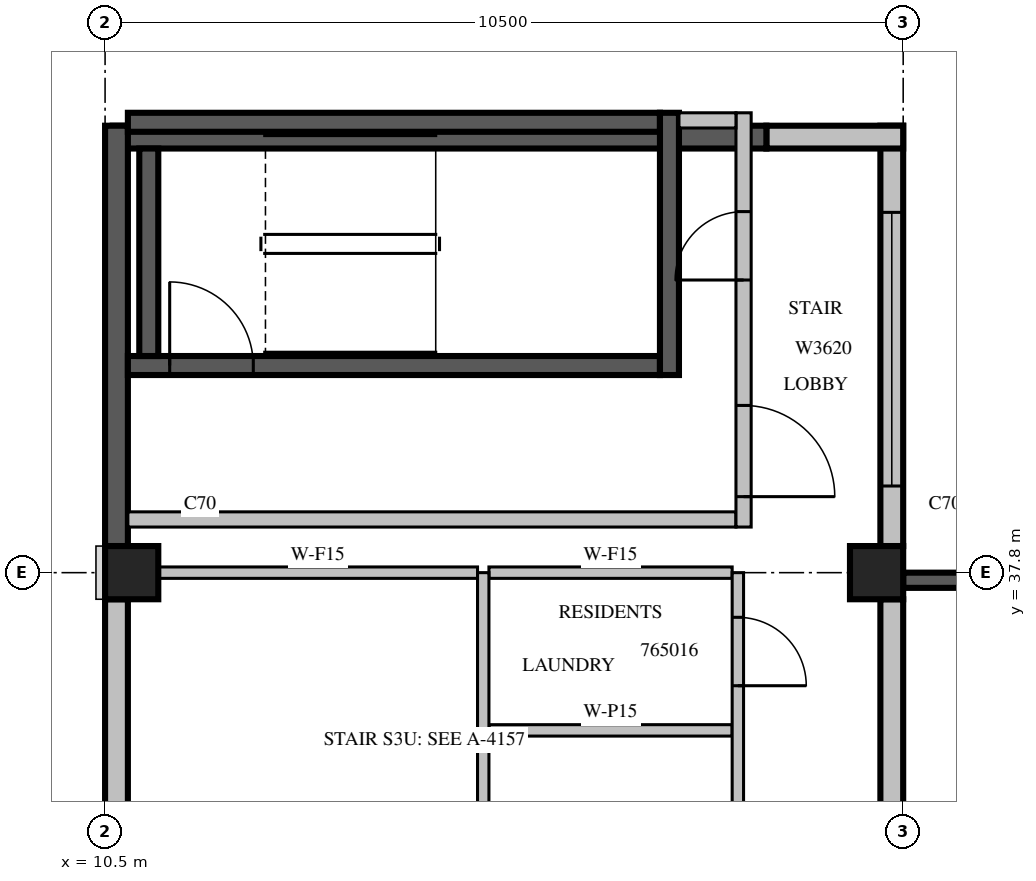
"""IFC4 building model, lengths in metres.
Left out: names, types, materials, properties, quantities, classifications, styles, units other than length and angle.
Written with IfcOpenShell. Run it as: python <this file> out.ifc"""

import sys

from ifc_helpers import new_model, si_unit, direction, frame, frame_2d, origin, origin_2d, place, context, subcontext, project, spatial, rectangle, extrude, source, transform, mapped, element, fill, save


model = new_model("IFC4")
c1 = context("Model", 3, precision=1e-05, world=origin(), true_north=direction((0.0, 1.0)))
c2 = subcontext(c1, "Body", "Model", "MODEL_VIEW")
j1 = project(units=[si_unit("LENGTHUNIT", "METRE"), si_unit("PLANEANGLEUNIT", "RADIAN")], contexts=[c1])
p1 = place(None, origin())
s1 = spatial("IfcSite", under=j1, at=p1, CompositionType="ELEMENT")
p2 = place(p1, origin())
s2 = spatial("IfcBuilding", under=s1, at=p2, CompositionType="ELEMENT")
p3 = place(p2, frame((0.0, 0.0, 288.0)))
s3 = spatial("IfcBuildingStorey", under=s2, at=p3, CompositionType="ELEMENT", Elevation=288.0)
m1 = source(origin(), c2, "Body", "SweptSolid", [
    extrude(rectangle(XDim=0.7, YDim=0.7, at=origin_2d()), origin(), (0.0, 0.0, 1.0), 3.5),
])
for number, where, z_axis, x_axis in (
    (1, (10.85, 37.8, 0.0), (0.0, 0.0, 1.0), (1.0, 0.0, 0.0)),
    (2, (20.65, 37.8, 0.0), (0.0, 0.0, 1.0), (1.0, 0.0, 0.0)),
):
    element("IfcColumn", number, at=place(p3, frame(where, z_axis=z_axis, x_axis=x_axis)), inside=s3, PredefinedType="COLUMN", context=c2, shape_type="MappedRepresentation", body=[
        mapped(m1, transform((0.0, 0.0, 0.0), scale=1.0)),
    ])
m2 = source(origin(), c2, "Body", "SweptSolid", [
    extrude(rectangle(XDim=7.7, YDim=0.3, at=frame_2d((3.85, 0.0))), origin(), (0.0, 0.0, 1.0), 3.1),
])
p4 = place(p3, frame((20.85, 29.75, 0.0), z_axis=(0.0, 0.0, 1.0), x_axis=(0.0, 1.0, 0.0)))
e3 = element("IfcWall", 3, at=p4, inside=s3, PredefinedType="STANDARD", context=c2, shape_type="MappedRepresentation", body=[
    mapped(m2, transform((0.0, 0.0, 0.0), scale=1.0)),
])
m3 = source(origin(), c2, "Body", "SweptSolid", [
    extrude(rectangle(XDim=1.0, YDim=2.1, at=frame_2d((0.5, 1.05))), frame((0.0, 0.16, 0.0), z_axis=(0.0, -1.0, 0.0), x_axis=(1.0, 0.0, 0.0)), (0.0, 0.0, 1.0), 0.32),
])
p5 = place(p4, frame((3.35, 0.0, 0.0)))
e4 = element("IfcOpeningElement", 4, at=p5, cuts=e3, PredefinedType="OPENING", context=c2, shape_type="MappedRepresentation", body=[
    mapped(m3, transform((0.0, 0.0, 0.0), scale=1.0)),
])
m4 = source(origin(), c2, "Body", "SweptSolid", [
    extrude(rectangle(XDim=5.53, YDim=0.3, at=frame_2d((2.765, 0.0))), origin(), (0.0, 0.0, 1.0), 3.1),
])
p6 = place(p3, frame((20.85, 38.15, 0.0), z_axis=(0.0, 0.0, 1.0), x_axis=(0.0, 1.0, 0.0)))
e5 = element("IfcWall", 5, at=p6, inside=s3, PredefinedType="STANDARD", context=c2, shape_type="MappedRepresentation", body=[
    mapped(m4, transform((0.0, 0.0, 0.0), scale=1.0)),
])
m5 = source(origin(), c2, "Body", "SweptSolid", [
    extrude(rectangle(XDim=3.6, YDim=2.0, at=frame_2d((1.8, 1.0))), frame((0.0, 0.16, 0.0), z_axis=(0.0, -1.0, 0.0), x_axis=(1.0, 0.0, 0.0)), (0.0, 0.0, 1.0), 0.32),
])
p7 = place(p6, frame((0.79, 0.0, 0.6)))
e6 = element("IfcOpeningElement", 6, at=p7, cuts=e5, PredefinedType="OPENING", context=c2, shape_type="MappedRepresentation", body=[
    mapped(m5, transform((0.0, 0.0, 0.0), scale=1.0)),
])
m6 = source(origin(), c2, "Body", "SweptSolid", [
    extrude(rectangle(XDim=1.8, YDim=0.3, at=frame_2d((0.9, 0.0))), origin(), (0.0, 0.0, 1.0), 3.1),
])
p8 = place(p3, frame((21.0, 43.53, 0.0), z_axis=(0.0, 0.0, 1.0), x_axis=(-1.0, 0.0, 0.0)))
e7 = element("IfcWall", 7, at=p8, inside=s3, PredefinedType="STANDARD", context=c2, shape_type="MappedRepresentation", body=[
    mapped(m6, transform((0.0, 0.0, 0.0), scale=1.0)),
])
m7 = source(origin(), c2, "Body", "SweptSolid", [
    extrude(rectangle(XDim=8.6, YDim=0.3, at=frame_2d((4.3, 0.0))), origin(), (0.0, 0.0, 1.0), 3.1),
])
p9 = place(p3, frame((19.2, 43.53, 0.0), z_axis=(0.0, 0.0, 1.0), x_axis=(-1.0, 0.0, 0.0)))
e8 = element("IfcWall", 8, at=p9, inside=s3, PredefinedType="SOLIDWALL", context=c2, shape_type="MappedRepresentation", body=[
    mapped(m7, transform((0.0, 0.0, 0.0), scale=1.0)),
])
m8 = source(origin(), c2, "Body", "SweptSolid", [
    extrude(rectangle(XDim=5.53, YDim=0.3, at=frame_2d((2.765, 0.0))), origin(), (0.0, 0.0, 1.0), 3.1),
])
p10 = place(p3, frame((10.65, 43.68, 0.0), z_axis=(0.0, 0.0, 1.0), x_axis=(0.0, -1.0, 0.0)))
e9 = element("IfcWall", 9, at=p10, inside=s3, PredefinedType="SOLIDWALL", context=c2, shape_type="MappedRepresentation", body=[
    mapped(m8, transform((0.0, 0.0, 0.0), scale=1.0)),
])
p11 = place(p3, frame((10.65, 37.45, 0.0), z_axis=(0.0, 0.0, 1.0), x_axis=(0.0, -1.0, 0.0)))
e10 = element("IfcWall", 10, at=p11, inside=s3, PredefinedType="STANDARD", context=c2, shape_type="SweptSolid", body=[
    extrude(rectangle(XDim=6.37, YDim=0.3, at=frame_2d((3.185, 0.0))), origin(), (0.0, 0.0, 1.0), 3.1),
])
m9 = source(origin(), c2, "Body", "SweptSolid", [
    extrude(rectangle(XDim=3.0, YDim=2.0, at=frame_2d((1.5, 1.0))), frame((0.0, 0.16, 0.0), z_axis=(0.0, -1.0, 0.0), x_axis=(1.0, 0.0, 0.0)), (0.0, 0.0, 1.0), 0.32),
])
p12 = place(p11, frame((2.77, 0.0, 0.6)))
e11 = element("IfcOpeningElement", 11, at=p12, cuts=e10, PredefinedType="OPENING", context=c2, shape_type="MappedRepresentation", body=[
    mapped(m9, transform((0.0, 0.0, 0.0), scale=1.0)),
])
m10 = source(origin(), c2, "Body", "SweptSolid", [
    extrude(rectangle(XDim=3.9, YDim=0.2, at=frame_2d((1.95, 0.0))), origin(), (0.0, 0.0, 1.0), 3.09),
])
p13 = place(p3, frame((21.0, 37.7, 0.0), z_axis=(0.0, 0.0, 1.0), x_axis=(1.0, 0.0, 0.0)))
e12 = element("IfcWall", 12, at=p13, inside=s3, PredefinedType="SOLIDWALL", context=c2, shape_type="MappedRepresentation", body=[
    mapped(m10, transform((0.0, 0.0, 0.0), scale=1.0)),
])
m11 = source(origin(), c2, "Body", "SweptSolid", [
    extrude(rectangle(XDim=2.4, YDim=2.0, at=frame_2d((1.2, 1.0))), frame((0.0, 0.11, 0.0), z_axis=(0.0, -1.0, 0.0), x_axis=(1.0, 0.0, 0.0)), (0.0, 0.0, 1.0), 0.22),
])
p14 = place(p13, frame((0.75, 0.0, 0.6)))
e13 = element("IfcOpeningElement", 13, at=p14, cuts=e12, PredefinedType="OPENING", context=c2, shape_type="MappedRepresentation", body=[
    mapped(m11, transform((0.0, 0.0, 0.0), scale=1.0)),
])
m12 = source(origin(), c2, "Body", "SweptSolid", [
    extrude(rectangle(XDim=7.0, YDim=0.25, at=frame_2d((3.5, 0.0))), origin(), (0.0, 0.0, 1.0), 3.1),
])
p15 = place(p3, frame((10.8, 40.525, 0.0), z_axis=(0.0, 0.0, 1.0), x_axis=(1.0, 0.0, 0.0)))
e14 = element("IfcWall", 14, at=p15, inside=s3, PredefinedType="SOLIDWALL", context=c2, shape_type="MappedRepresentation", body=[
    mapped(m12, transform((0.0, 0.0, 0.0), scale=1.0)),
])
m13 = source(origin(), c2, "Body", "SweptSolid", [
    extrude(rectangle(XDim=1.1, YDim=2.1, at=frame_2d((0.55, 1.05))), frame((0.0, 0.135, 0.0), z_axis=(0.0, -1.0, 0.0), x_axis=(1.0, 0.0, 0.0)), (0.0, 0.0, 1.0), 0.27),
])
p16 = place(p15, frame((0.55, 0.0, 0.0)))
e15 = element("IfcOpeningElement", 15, at=p16, cuts=e14, PredefinedType="OPENING", context=c2, shape_type="MappedRepresentation", body=[
    mapped(m13, transform((0.0, 0.0, 0.0), scale=1.0)),
])
p17 = place(p3, frame((10.8, 43.725, 0.0), z_axis=(0.0, 0.0, 1.0), x_axis=(1.0, 0.0, 0.0)))
e16 = element("IfcWall", 16, at=p17, inside=s3, PredefinedType="SOLIDWALL", context=c2, shape_type="MappedRepresentation", body=[
    mapped(m12, transform((0.0, 0.0, 0.0), scale=1.0)),
])
m14 = source(origin(), c2, "Body", "SweptSolid", [
    extrude(rectangle(XDim=3.45, YDim=0.25, at=frame_2d((1.725, 0.0))), origin(), (0.0, 0.0, 1.0), 3.1),
])
p18 = place(p3, frame((17.925, 40.4, 0.0), z_axis=(0.0, 0.0, 1.0), x_axis=(0.0, 1.0, 0.0)))
e17 = element("IfcWall", 17, at=p18, inside=s3, PredefinedType="SOLIDWALL", context=c2, shape_type="MappedRepresentation", body=[
    mapped(m14, transform((0.0, 0.0, 0.0), scale=1.0)),
])
m15 = source(origin(), c2, "Body", "SweptSolid", [
    extrude(rectangle(XDim=2.73, YDim=0.25, at=frame_2d((1.365, 0.0))), origin(), (0.0, 0.0, 1.0), 3.1),
])
p19 = place(p3, frame((11.075, 40.65, 0.0), z_axis=(0.0, 0.0, 1.0), x_axis=(0.0, 1.0, 0.0)))
e18 = element("IfcWall", 18, at=p19, inside=s3, PredefinedType="SOLIDWALL", context=c2, shape_type="MappedRepresentation", body=[
    mapped(m15, transform((0.0, 0.0, 0.0), scale=1.0)),
])
m16 = source(origin(), c2, "Body", "SweptSolid", [
    extrude(rectangle(XDim=8.0, YDim=0.2, at=frame_2d((4.0, 0.0))), origin(), (0.0, 0.0, 1.0), 3.1),
])
p20 = place(p3, frame((10.8, 38.5, 0.0), z_axis=(0.0, 0.0, 1.0), x_axis=(1.0, 0.0, 0.0)))
e19 = element("IfcWall", 19, at=p20, inside=s3, PredefinedType="PARTITIONING", context=c2, shape_type="MappedRepresentation", body=[
    mapped(m16, transform((0.0, 0.0, 0.0), scale=1.0)),
])
m17 = source(origin(), c2, "Body", "SweptSolid", [
    extrude(rectangle(XDim=5.45, YDim=0.2, at=frame_2d((2.725, 0.0))), origin(), (0.0, 0.0, 1.0), 3.1),
])
p21 = place(p3, frame((18.9, 38.4, 0.0), z_axis=(0.0, 0.0, 1.0), x_axis=(0.0, 1.0, 0.0)))
e20 = element("IfcWall", 20, at=p21, inside=s3, PredefinedType="PARTITIONING", context=c2, shape_type="MappedRepresentation", body=[
    mapped(m17, transform((0.0, 0.0, 0.0), scale=1.0)),
])
m18 = source(origin(), c2, "Body", "SweptSolid", [
    extrude(rectangle(XDim=1.2, YDim=2.1, at=frame_2d((0.6, 1.05))), frame((0.0, 0.11, 0.0), z_axis=(0.0, -1.0, 0.0), x_axis=(1.0, 0.0, 0.0)), (0.0, 0.0, 1.0), 0.22),
])
p22 = place(p21, frame((0.4, 0.0, 0.0)))
e21 = element("IfcOpeningElement", 21, at=p22, cuts=e20, PredefinedType="OPENING", context=c2, shape_type="MappedRepresentation", body=[
    mapped(m18, transform((0.0, 0.0, 0.0), scale=1.0)),
])
m19 = source(origin(), c2, "Body", "SweptSolid", [
    extrude(rectangle(XDim=0.9, YDim=2.1, at=frame_2d((0.45, 1.05))), frame((0.0, 0.11, 0.0), z_axis=(0.0, -1.0, 0.0), x_axis=(1.0, 0.0, 0.0)), (0.0, 0.0, 1.0), 0.22),
])
p23 = place(p21, frame((3.25, 0.0, 0.0)))
e22 = element("IfcOpeningElement", 22, at=p23, cuts=e20, PredefinedType="OPENING", context=c2, shape_type="MappedRepresentation", body=[
    mapped(m19, transform((0.0, 0.0, 0.0), scale=1.0)),
])
m20 = source(origin(), c2, "Body", "SweptSolid", [
    extrude(rectangle(XDim=0.75, YDim=0.2, at=frame_2d((0.375, 0.0))), origin(), (0.0, 0.0, 1.0), 3.1),
])
p24 = place(p3, frame((18.05, 43.75, 0.0), z_axis=(0.0, 0.0, 1.0), x_axis=(1.0, 0.0, 0.0)))
e23 = element("IfcWall", 23, at=p24, inside=s3, PredefinedType="PARTITIONING", context=c2, shape_type="MappedRepresentation", body=[
    mapped(m20, transform((0.0, 0.0, 0.0), scale=1.0)),
])
m21 = source(origin(), c2, "Body", "SweptSolid", [
    extrude(rectangle(XDim=3.2, YDim=0.15, at=frame_2d((1.6, 0.0))), origin(), (0.0, 0.0, 1.0), 3.1),
])
p25 = place(p3, frame((18.75, 35.725, 0.0), z_axis=(0.0, 0.0, 1.0), x_axis=(-1.0, 0.0, 0.0)))
e24 = element("IfcWall", 24, at=p25, inside=s3, PredefinedType="PARTITIONING", context=c2, shape_type="MappedRepresentation", body=[
    mapped(m21, transform((0.0, 0.0, 0.0), scale=1.0)),
])
m22 = source(origin(), c2, "Body", "SweptSolid", [
    extrude(rectangle(XDim=4.201, YDim=0.15, at=frame_2d((2.1, 0.0))), origin(), (0.0, 0.0, 1.0), 3.1),
])
p26 = place(p3, frame((15.4, 37.8, 0.0), z_axis=(0.0, 0.0, 1.0), x_axis=(-1.0, 0.0, 0.0)))
e25 = element("IfcWall", 25, at=p26, inside=s3, PredefinedType="PARTITIONING", context=c2, shape_type="MappedRepresentation", body=[
    mapped(m22, transform((0.0, 0.0, 0.0), scale=1.0)),
])
p27 = place(p3, frame((18.75, 37.8, 0.0), z_axis=(0.0, 0.0, 1.0), x_axis=(-1.0, 0.0, 0.0)))
e26 = element("IfcWall", 26, at=p27, inside=s3, PredefinedType="PARTITIONING", context=c2, shape_type="MappedRepresentation", body=[
    mapped(m21, transform((0.0, 0.0, 0.0), scale=1.0)),
])
m23 = source(origin(), c2, "Body", "SweptSolid", [
    extrude(rectangle(XDim=8.4, YDim=0.15, at=frame_2d((4.2, 0.0))), origin(), (0.0, 0.0, 1.0), 3.1),
])
p28 = place(p3, frame((15.475, 29.4, 0.0), z_axis=(0.0, 0.0, 1.0), x_axis=(0.0, 1.0, 0.0)))
e27 = element("IfcWall", 27, at=p28, inside=s3, PredefinedType="PARTITIONING", context=c2, shape_type="MappedRepresentation", body=[
    mapped(m23, transform((0.0, 0.0, 0.0), scale=1.0)),
])
m24 = source(origin(), c2, "Body", "SweptSolid", [
    extrude(rectangle(XDim=1.2, YDim=2.1, at=frame_2d((0.6, 1.05))), frame((0.0, 0.085, 0.0), z_axis=(0.0, -1.0, 0.0), x_axis=(1.0, 0.0, 0.0)), (0.0, 0.0, 1.0), 0.17),
])
p29 = place(p28, frame((2.612, 0.0, 0.0)))
e28 = element("IfcOpeningElement", 28, at=p29, cuts=e27, PredefinedType="OPENING", context=c2, shape_type="MappedRepresentation", body=[
    mapped(m24, transform((0.0, 0.0, 0.0), scale=1.0)),
])
p30 = place(p3, frame((18.825, 29.4, 0.0), z_axis=(0.0, 0.0, 1.0), x_axis=(0.0, 1.0, 0.0)))
e29 = element("IfcWall", 29, at=p30, inside=s3, PredefinedType="PARTITIONING", context=c2, shape_type="MappedRepresentation", body=[
    mapped(m23, transform((0.0, 0.0, 0.0), scale=1.0)),
])
p31 = place(p30, frame((2.562, 0.0, 0.0)))
e30 = element("IfcOpeningElement", 30, at=p31, cuts=e29, PredefinedType="OPENING", context=c2, shape_type="MappedRepresentation", body=[
    mapped(m24, transform((0.0, 0.0, 0.0), scale=1.0)),
])
m25 = source(origin(), c2, "Body", "SweptSolid", [
    extrude(rectangle(XDim=0.9, YDim=2.1, at=frame_2d((0.45, 1.05))), frame((0.0, 0.085, 0.0), z_axis=(0.0, -1.0, 0.0), x_axis=(1.0, 0.0, 0.0)), (0.0, 0.0, 1.0), 0.17),
])
p32 = place(p30, frame((6.912, 0.0, 0.0)))
e31 = element("IfcOpeningElement", 31, at=p32, cuts=e29, PredefinedType="OPENING", context=c2, shape_type="MappedRepresentation", body=[
    mapped(m25, transform((0.0, 0.0, 0.0), scale=1.0)),
])
m26 = source(origin(), c2, "Body", "SweptSolid", [
    extrude(rectangle(XDim=3.6, YDim=2.0, at=frame_2d((1.8, 1.0))), frame((0.0, 0.03, 0.0), z_axis=(0.0, -1.0, 0.0), x_axis=(1.0, 0.0, 0.0)), (0.0, 0.0, 1.0), 0.06),
])
p33 = place(p7, origin())
e32 = element("IfcWindow", 32, at=p33, inside=s3, PartitioningType="SINGLE_PANEL", PredefinedType="WINDOW", context=c2, shape_type="MappedRepresentation", body=[
    mapped(m26, transform((0.0, 0.0, 0.0), scale=1.0)),
])
fill(e6, e32)
m27 = source(origin(), c2, "Body", "SweptSolid", [
    extrude(rectangle(XDim=1.1, YDim=2.1, at=frame_2d((0.55, 1.05))), frame((0.0, 0.025, 0.0), z_axis=(0.0, -1.0, 0.0), x_axis=(1.0, 0.0, 0.0)), (0.0, 0.0, 1.0), 0.05),
])
p34 = place(p16, origin())
e33 = element("IfcDoor", 33, at=p34, inside=s3, OperationType="SINGLE_SWING_LEFT", PredefinedType="DOOR", context=c2, shape_type="MappedRepresentation", body=[
    mapped(m27, transform((0.0, 0.0, 0.0), scale=1.0)),
])
fill(e15, e33)
m28 = source(origin(), c2, "Body", "SweptSolid", [
    extrude(rectangle(XDim=1.2, YDim=2.1, at=frame_2d((0.6, 1.05))), frame((0.0, 0.025, 0.0), z_axis=(0.0, -1.0, 0.0), x_axis=(1.0, 0.0, 0.0)), (0.0, 0.0, 1.0), 0.05),
])
p35 = place(p22, origin())
e34 = element("IfcDoor", 34, at=p35, inside=s3, OperationType="SINGLE_SWING_RIGHT", PredefinedType="DOOR", context=c2, shape_type="MappedRepresentation", body=[
    mapped(m28, transform((0.0, 0.0, 0.0), scale=1.0)),
])
fill(e21, e34)
m29 = source(origin(), c2, "Body", "SweptSolid", [
    extrude(rectangle(XDim=0.9, YDim=2.1, at=frame_2d((0.45, 1.05))), frame((0.0, 0.025, 0.0), z_axis=(0.0, -1.0, 0.0), x_axis=(1.0, 0.0, 0.0)), (0.0, 0.0, 1.0), 0.05),
])
p36 = place(p23, origin())
e35 = element("IfcDoor", 35, at=p36, inside=s3, OperationType="SINGLE_SWING_LEFT", PredefinedType="DOOR", context=c2, shape_type="MappedRepresentation", body=[
    mapped(m29, transform((0.0, 0.0, 0.0), scale=1.0)),
])
fill(e22, e35)
p37 = place(p32, origin())
e36 = element("IfcDoor", 36, at=p37, inside=s3, OperationType="SINGLE_SWING_RIGHT", PredefinedType="DOOR", context=c2, shape_type="MappedRepresentation", body=[
    mapped(m29, transform((0.0, 0.0, 0.0), scale=1.0)),
])
fill(e31, e36)
save(model, sys.argv[1])
